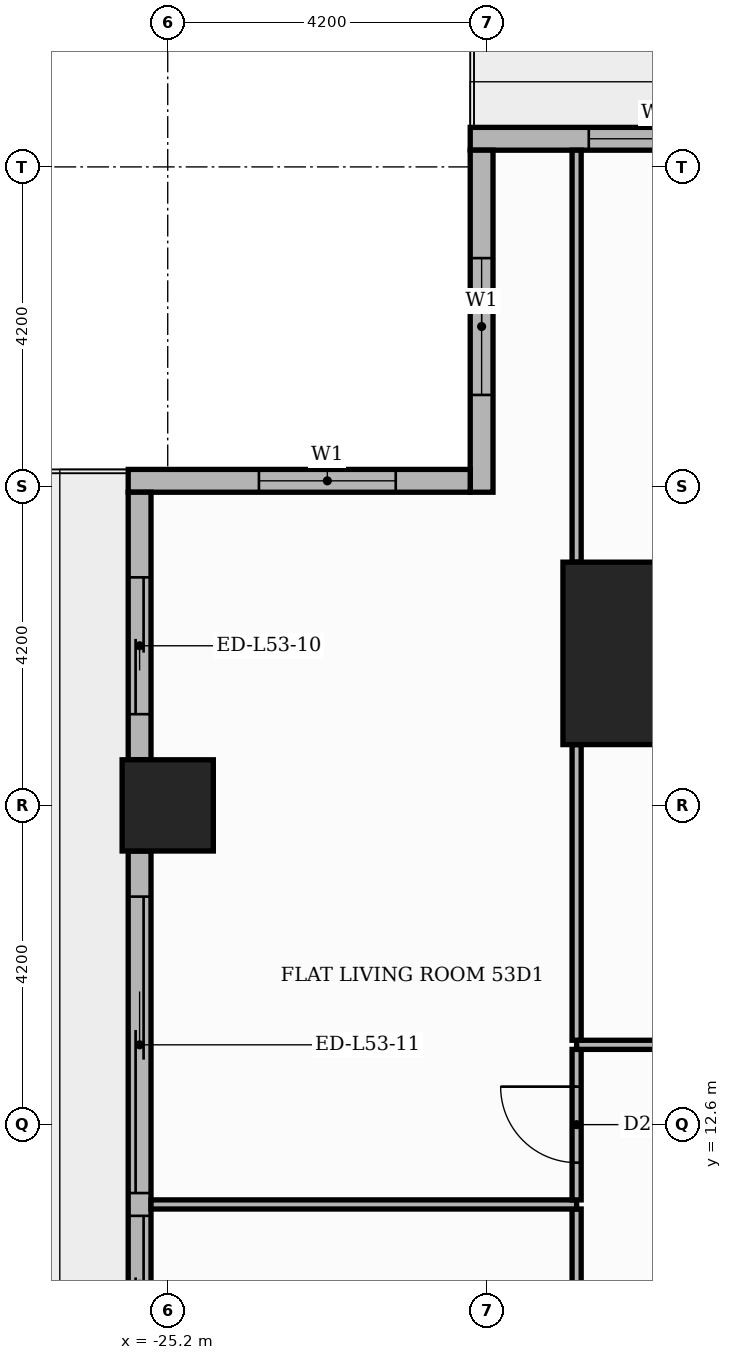
"""IFC4 building model, lengths in metres.
Left out: names, types, materials, properties, quantities, classifications, styles, units other than length and angle.
Written with IfcOpenShell. Run it as: python <this file> out.ifc"""

import sys

from ifc_helpers import new_model, si_unit, direction, frame, frame_2d, origin, origin_2d, place, context, subcontext, project, spatial, rectangle, extrude, element, fill, save


model = new_model("IFC4")
c1 = context("Model", 3, precision=1e-05, world=origin(), true_north=direction((0.0, 1.0)))
c2 = subcontext(c1, "Body", "Model", "MODEL_VIEW")
j1 = project(units=[si_unit("LENGTHUNIT", "METRE"), si_unit("PLANEANGLEUNIT", "RADIAN")], contexts=[c1])
p1 = place(None, origin())
s1 = spatial("IfcSite", under=j1, at=p1, CompositionType="ELEMENT")
p2 = place(p1, origin())
s2 = spatial("IfcBuilding", under=s1, at=p2, CompositionType="ELEMENT")
p3 = place(p2, frame((0.0, 0.0, 223.5)))
s3 = spatial("IfcBuildingStorey", under=s2, at=p3, CompositionType="ELEMENT", Elevation=223.5)
p4 = place(p3, frame((-18.8, 18.8, 0.0), z_axis=(0.0, 0.0, 1.0), x_axis=(1.0, 0.0, 0.0)))
e1 = element("IfcColumn", 1, at=p4, inside=s3, PredefinedType="COLUMN", context=c2, shape_type="SweptSolid", body=[
    extrude(rectangle(XDim=2.4, YDim=2.4, at=origin_2d()), origin(), (0.0, 0.0, 1.0), 3.9),
])
p5 = place(p3, frame((-25.2, 16.8, 0.0), z_axis=(0.0, 0.0, 1.0), x_axis=(1.0, 0.0, 0.0)))
e2 = element("IfcColumn", 2, at=p5, inside=s3, PredefinedType="COLUMN", context=c2, shape_type="SweptSolid", body=[
    extrude(rectangle(XDim=1.2, YDim=1.2, at=origin_2d()), origin(), (0.0, 0.0, 1.0), 3.9),
])
p6 = place(p3, frame((-17.4, 25.57, 0.0), z_axis=(0.0, 0.0, 1.0), x_axis=(-1.0, 0.0, 0.0)))
e3 = element("IfcWall", 3, at=p6, inside=s3, PredefinedType="STANDARD", context=c2, shape_type="SweptSolid", body=[
    extrude(rectangle(XDim=3.82, YDim=0.3, at=frame_2d((1.91, 0.0))), origin(), (0.0, 0.0, 1.0), 3.48),
])
p7 = place(p6, frame((0.46, 0.0, 0.9)))
e4 = element("IfcOpeningElement", 4, at=p7, cuts=e3, PredefinedType="OPENING", context=c2, shape_type="SweptSolid", body=[
    extrude(rectangle(XDim=1.8, YDim=2.1, at=frame_2d((0.9, 1.05))), frame((0.0, 0.16, 0.0), z_axis=(0.0, -1.0, 0.0), x_axis=(1.0, 0.0, 0.0)), (0.0, 0.0, 1.0), 0.32),
])
p8 = place(p3, frame((-21.07, 25.42, 0.0), z_axis=(0.0, 0.0, 1.0), x_axis=(0.0, -1.0, 0.0)))
e5 = element("IfcWall", 5, at=p8, inside=s3, PredefinedType="STANDARD", context=c2, shape_type="SweptSolid", body=[
    extrude(rectangle(XDim=4.5, YDim=0.3, at=frame_2d((2.25, 0.0))), origin(), (0.0, 0.0, 1.0), 3.48),
])
p9 = place(p8, frame((1.42, 0.0, 0.9)))
e6 = element("IfcOpeningElement", 6, at=p9, cuts=e5, PredefinedType="OPENING", context=c2, shape_type="SweptSolid", body=[
    extrude(rectangle(XDim=1.8, YDim=2.1, at=frame_2d((0.9, 1.05))), frame((0.0, 0.16, 0.0), z_axis=(0.0, -1.0, 0.0), x_axis=(1.0, 0.0, 0.0)), (0.0, 0.0, 1.0), 0.32),
])
p10 = place(p3, frame((-21.22, 21.07, 0.0), z_axis=(0.0, 0.0, 1.0), x_axis=(-1.0, 0.0, 0.0)))
e7 = element("IfcWall", 7, at=p10, inside=s3, PredefinedType="STANDARD", context=c2, shape_type="SweptSolid", body=[
    extrude(rectangle(XDim=4.5, YDim=0.3, at=frame_2d((2.25, 0.0))), origin(), (0.0, 0.0, 1.0), 3.48),
])
p11 = place(p10, frame((0.98, 0.0, 0.9)))
e8 = element("IfcOpeningElement", 8, at=p11, cuts=e7, PredefinedType="OPENING", context=c2, shape_type="SweptSolid", body=[
    extrude(rectangle(XDim=1.8, YDim=2.1, at=frame_2d((0.9, 1.05))), frame((0.0, 0.16, 0.0), z_axis=(0.0, -1.0, 0.0), x_axis=(1.0, 0.0, 0.0)), (0.0, 0.0, 1.0), 0.32),
])
p12 = place(p3, frame((-25.57, 20.92, 0.0), z_axis=(0.0, 0.0, 1.0), x_axis=(0.0, -1.0, 0.0)))
e9 = element("IfcWall", 9, at=p12, inside=s3, PredefinedType="STANDARD", context=c2, shape_type="SweptSolid", body=[
    extrude(rectangle(XDim=3.52, YDim=0.3, at=frame_2d((1.76, 0.0))), origin(), (0.0, 0.0, 1.0), 3.48),
])
p13 = place(p12, frame((1.12, 0.0, 0.0)))
e10 = element("IfcOpeningElement", 10, at=p13, cuts=e9, PredefinedType="OPENING", context=c2, shape_type="SweptSolid", body=[
    extrude(rectangle(XDim=1.8, YDim=2.4, at=frame_2d((0.9, 1.2))), frame((0.0, 0.16, 0.0), z_axis=(0.0, -1.0, 0.0), x_axis=(1.0, 0.0, 0.0)), (0.0, 0.0, 1.0), 0.32),
])
p14 = place(p3, frame((-25.57, 16.2, 0.0), z_axis=(0.0, 0.0, 1.0), x_axis=(0.0, -1.0, 0.0)))
e11 = element("IfcWall", 11, at=p14, inside=s3, PredefinedType="STANDARD", context=c2, shape_type="SweptSolid", body=[
    extrude(rectangle(XDim=7.2, YDim=0.3, at=frame_2d((3.6, 0.0))), origin(), (0.0, 0.0, 1.0), 3.48),
])
p15 = place(p14, frame((0.6, 0.0, 0.0)))
e12 = element("IfcOpeningElement", 12, at=p15, cuts=e11, PredefinedType="OPENING", context=c2, shape_type="SweptSolid", body=[
    extrude(rectangle(XDim=3.9, YDim=2.4, at=frame_2d((1.95, 1.2))), frame((0.0, 0.16, 0.0), z_axis=(0.0, -1.0, 0.0), x_axis=(1.0, 0.0, 0.0)), (0.0, 0.0, 1.0), 0.32),
])
p16 = place(p14, frame((4.8, 0.0, 0.0)))
e13 = element("IfcOpeningElement", 13, at=p16, cuts=e11, PredefinedType="OPENING", context=c2, shape_type="SweptSolid", body=[
    extrude(rectangle(XDim=1.8, YDim=2.4, at=frame_2d((0.9, 1.2))), frame((0.0, 0.16, 0.0), z_axis=(0.0, -1.0, 0.0), x_axis=(1.0, 0.0, 0.0)), (0.0, 0.0, 1.0), 0.32),
])
p17 = place(p3, frame((-19.82, 5.31, 0.0), z_axis=(0.0, 0.0, 1.0), x_axis=(0.0, 1.0, 0.0)))
e14 = element("IfcWall", 14, at=p17, inside=s3, PredefinedType="PARTITIONING", context=c2, shape_type="SweptSolid", body=[
    extrude(rectangle(XDim=6.18, YDim=0.12, at=frame_2d((3.09, 0.0))), origin(), (0.0, 0.0, 1.0), 3.48),
])
p18 = place(p17, frame((2.64, 0.0, 0.0)))
e15 = element("IfcOpeningElement", 15, at=p18, cuts=e14, PredefinedType="OPENING", context=c2, shape_type="SweptSolid", body=[
    extrude(rectangle(XDim=0.9, YDim=2.1, at=frame_2d((0.45, 1.05))), frame((0.0, 0.07, 0.0), z_axis=(0.0, -1.0, 0.0), x_axis=(1.0, 0.0, 0.0)), (0.0, 0.0, 1.0), 0.14),
])
p19 = place(p3, frame((-25.42, 11.55, 0.0), z_axis=(0.0, 0.0, 1.0), x_axis=(1.0, 0.0, 0.0)))
e16 = element("IfcWall", 16, at=p19, inside=s3, PredefinedType="PARTITIONING", context=c2, shape_type="SweptSolid", body=[
    extrude(rectangle(XDim=5.6, YDim=0.12, at=frame_2d((2.8, 0.0))), origin(), (0.0, 0.0, 1.0), 3.48),
])
p20 = place(p3, frame((-19.82, 11.61, 0.0), z_axis=(0.0, 0.0, 1.0), x_axis=(0.0, 1.0, 0.0)))
e17 = element("IfcWall", 17, at=p20, inside=s3, PredefinedType="PARTITIONING", context=c2, shape_type="SweptSolid", body=[
    extrude(rectangle(XDim=1.98, YDim=0.12, at=frame_2d((0.99, 0.0))), origin(), (0.0, 0.0, 1.0), 3.48),
])
p21 = place(p20, frame((0.49, 0.0, 0.0)))
e18 = element("IfcOpeningElement", 18, at=p21, cuts=e17, PredefinedType="OPENING", context=c2, shape_type="SweptSolid", body=[
    extrude(rectangle(XDim=1.0, YDim=2.1, at=frame_2d((0.5, 1.05))), frame((0.0, 0.07, 0.0), z_axis=(0.0, -1.0, 0.0), x_axis=(1.0, 0.0, 0.0)), (0.0, 0.0, 1.0), 0.14),
])
p22 = place(p3, frame((-19.82, 13.65, 0.0), z_axis=(0.0, 0.0, 1.0), x_axis=(1.0, 0.0, 0.0)))
e19 = element("IfcWall", 19, at=p22, inside=s3, PredefinedType="PARTITIONING", context=c2, shape_type="SweptSolid", body=[
    extrude(rectangle(XDim=6.17, YDim=0.12, at=frame_2d((3.085, 0.0))), origin(), (0.0, 0.0, 1.0), 3.48),
])
p23 = place(p22, frame((2.635, 0.0, 0.0)))
e20 = element("IfcOpeningElement", 20, at=p23, cuts=e19, PredefinedType="OPENING", context=c2, shape_type="SweptSolid", body=[
    extrude(rectangle(XDim=0.9, YDim=2.1, at=frame_2d((0.45, 1.05))), frame((0.0, 0.07, 0.0), z_axis=(0.0, -1.0, 0.0), x_axis=(1.0, 0.0, 0.0)), (0.0, 0.0, 1.0), 0.14),
])
p24 = place(p3, frame((-19.82, 13.71, 0.0), z_axis=(0.0, 0.0, 1.0), x_axis=(0.0, 1.0, 0.0)))
e21 = element("IfcWall", 21, at=p24, inside=s3, PredefinedType="PARTITIONING", context=c2, shape_type="SweptSolid", body=[
    extrude(rectangle(XDim=3.89, YDim=0.12, at=frame_2d((1.945, 0.0))), origin(), (0.0, 0.0, 1.0), 3.48),
])
p25 = place(p3, frame((-19.82, 20.0, 0.0), z_axis=(0.0, 0.0, 1.0), x_axis=(0.0, 1.0, 0.0)))
e22 = element("IfcWall", 22, at=p25, inside=s3, PredefinedType="PARTITIONING", context=c2, shape_type="SweptSolid", body=[
    extrude(rectangle(XDim=5.42, YDim=0.12, at=frame_2d((2.71, 0.0))), origin(), (0.0, 0.0, 1.0), 3.48),
])
p26 = place(p7, origin())
e23 = element("IfcWindow", 23, at=p26, inside=s3, PartitioningType="SINGLE_PANEL", PredefinedType="WINDOW", context=c2, shape_type="SweptSolid", body=[
    extrude(rectangle(XDim=1.8, YDim=2.1, at=frame_2d((0.9, 1.05))), frame((0.0, 0.03, 0.0), z_axis=(0.0, -1.0, 0.0), x_axis=(1.0, 0.0, 0.0)), (0.0, 0.0, 1.0), 0.06),
])
fill(e4, e23)
p27 = place(p9, origin())
e24 = element("IfcWindow", 24, at=p27, inside=s3, PartitioningType="SINGLE_PANEL", PredefinedType="WINDOW", context=c2, shape_type="SweptSolid", body=[
    extrude(rectangle(XDim=1.8, YDim=2.1, at=frame_2d((0.9, 1.05))), frame((0.0, 0.03, 0.0), z_axis=(0.0, -1.0, 0.0), x_axis=(1.0, 0.0, 0.0)), (0.0, 0.0, 1.0), 0.06),
])
fill(e6, e24)
p28 = place(p11, origin())
e25 = element("IfcWindow", 25, at=p28, inside=s3, PartitioningType="SINGLE_PANEL", PredefinedType="WINDOW", context=c2, shape_type="SweptSolid", body=[
    extrude(rectangle(XDim=1.8, YDim=2.1, at=frame_2d((0.9, 1.05))), frame((0.0, 0.03, 0.0), z_axis=(0.0, -1.0, 0.0), x_axis=(1.0, 0.0, 0.0)), (0.0, 0.0, 1.0), 0.06),
])
fill(e8, e25)
p29 = place(p13, origin())
e26 = element("IfcDoor", 26, at=p29, inside=s3, OperationType="SLIDING_TO_RIGHT", PredefinedType="DOOR", context=c2, shape_type="SweptSolid", body=[
    extrude(rectangle(XDim=1.8, YDim=2.4, at=frame_2d((0.9, 1.2))), frame((0.0, 0.025, 0.0), z_axis=(0.0, -1.0, 0.0), x_axis=(1.0, 0.0, 0.0)), (0.0, 0.0, 1.0), 0.05),
])
fill(e10, e26)
p30 = place(p15, origin())
e27 = element("IfcDoor", 27, at=p30, inside=s3, OperationType="SLIDING_TO_LEFT", PredefinedType="DOOR", context=c2, shape_type="SweptSolid", body=[
    extrude(rectangle(XDim=3.9, YDim=2.4, at=frame_2d((1.95, 1.2))), frame((0.0, 0.025, 0.0), z_axis=(0.0, -1.0, 0.0), x_axis=(1.0, 0.0, 0.0)), (0.0, 0.0, 1.0), 0.05),
])
fill(e12, e27)
p31 = place(p16, origin())
e28 = element("IfcDoor", 28, at=p31, inside=s3, OperationType="SLIDING_TO_RIGHT", PredefinedType="DOOR", context=c2, shape_type="SweptSolid", body=[
    extrude(rectangle(XDim=1.8, YDim=2.4, at=frame_2d((0.9, 1.2))), frame((0.0, 0.025, 0.0), z_axis=(0.0, -1.0, 0.0), x_axis=(1.0, 0.0, 0.0)), (0.0, 0.0, 1.0), 0.05),
])
fill(e13, e28)
p32 = place(p21, origin())
e29 = element("IfcDoor", 29, at=p32, inside=s3, OperationType="SINGLE_SWING_RIGHT", PredefinedType="DOOR", context=c2, shape_type="SweptSolid", body=[
    extrude(rectangle(XDim=1.0, YDim=2.1, at=frame_2d((0.5, 1.05))), frame((0.0, 0.025, 0.0), z_axis=(0.0, -1.0, 0.0), x_axis=(1.0, 0.0, 0.0)), (0.0, 0.0, 1.0), 0.05),
])
fill(e18, e29)
save(model, sys.argv[1])
